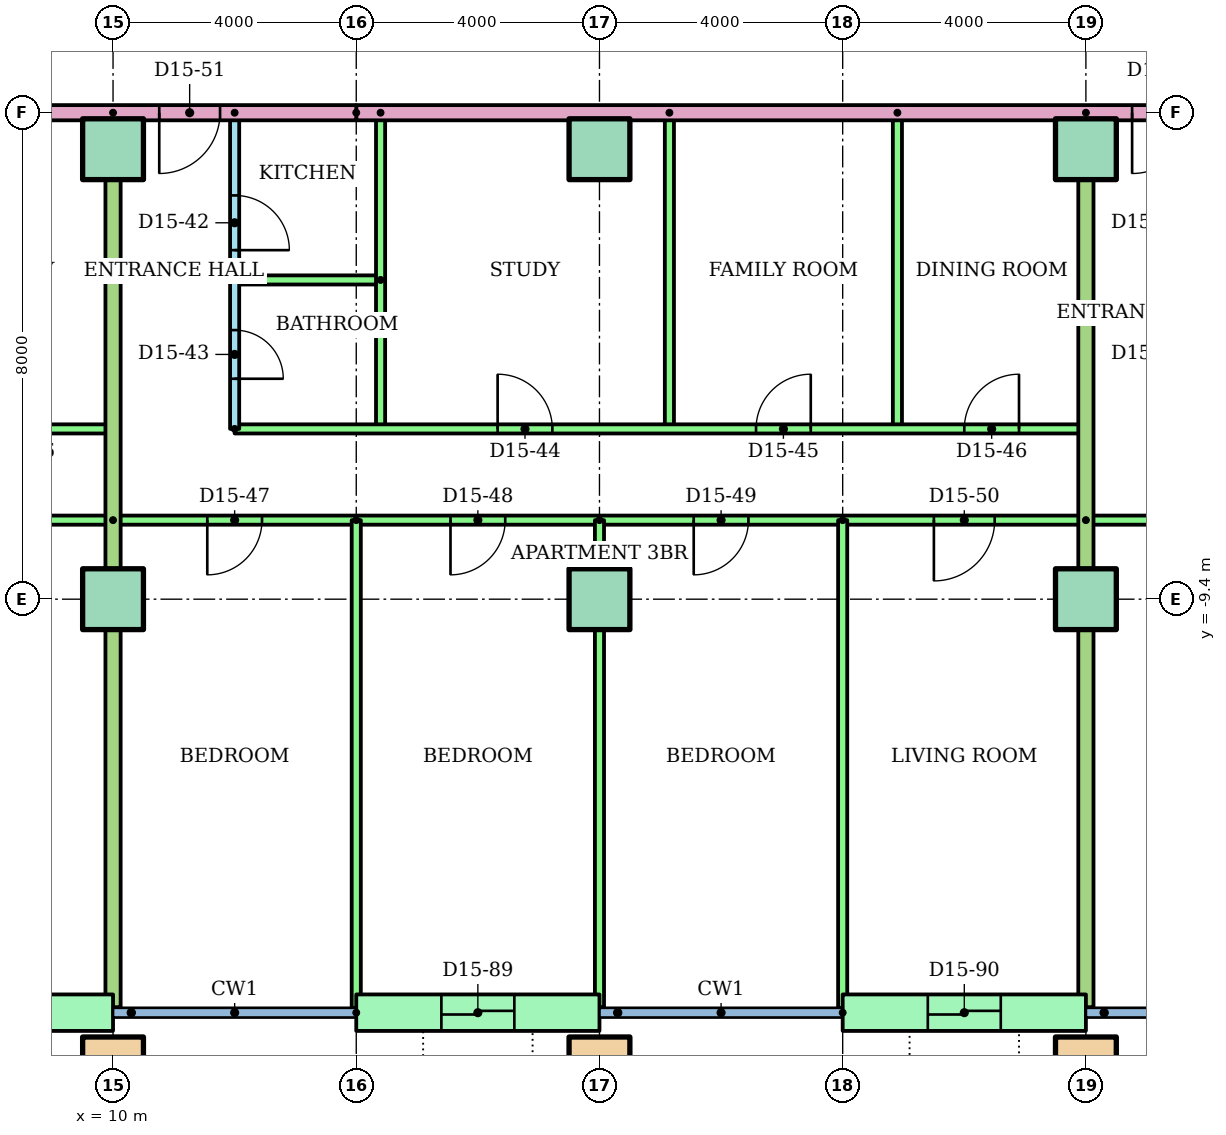
"""IFC4 building model, lengths in metres.
Left out: names, types, materials, properties, quantities, classifications, styles, units other than length and angle.
Written with IfcOpenShell. Run it as: python <this file> out.ifc"""

import sys

from ifc_helpers import new_model, si_unit, direction, frame, frame_2d, origin, origin_2d, place, context, subcontext, project, spatial, rectangle, hollow_rectangle, extrude, element, fill, save


model = new_model("IFC4")
c1 = context("Model", 3, precision=1e-05, world=origin(), true_north=direction((0.0, 1.0)))
c2 = subcontext(c1, "Body", "Model", "MODEL_VIEW")
j1 = project(units=[si_unit("LENGTHUNIT", "METRE"), si_unit("PLANEANGLEUNIT", "RADIAN")], contexts=[c1])
p1 = place(None, origin())
s1 = spatial("IfcSite", under=j1, at=p1, CompositionType="ELEMENT")
p2 = place(p1, origin())
s2 = spatial("IfcBuilding", under=s1, at=p2, CompositionType="ELEMENT")
p3 = place(p2, frame((0.0, 0.0, 57.6)))
s3 = spatial("IfcBuildingStorey", under=s2, at=p3, CompositionType="ELEMENT", Elevation=57.6)
for number, where in (
    (1, (10.0, -17.1, 0.0)),
    (2, (18.0, -17.1, 0.0)),
    (3, (26.0, -17.1, 0.0)),
):
    element("IfcColumn", number, at=place(p3, frame(where)), inside=s3, PredefinedType="COLUMN", context=c2, shape_type="SweptSolid", body=[
        extrude(hollow_rectangle(XDim=1.0, YDim=1.0, WallThickness=0.05, at=origin_2d()), origin(), (0.0, 0.0, 1.0), 3.2),
    ])
for number, where in (
    (4, (10.0, -9.4, 0.0)),
    (5, (18.0, -9.4, 0.0)),
    (6, (26.0, -9.4, 0.0)),
    (7, (10.0, -2.0, 0.0)),
    (8, (18.0, -2.0, 0.0)),
    (9, (26.0, -2.0, 0.0)),
):
    element("IfcColumn", number, at=place(p3, frame(where)), inside=s3, PredefinedType="COLUMN", context=c2, shape_type="SweptSolid", body=[
        extrude(rectangle(XDim=1.0, YDim=1.0, at=origin_2d()), origin(), (0.0, 0.0, 1.0), 3.2),
    ])
p4 = place(p3, frame((6.0, -16.2, 0.0)))
e10 = element("IfcWall", 10, at=p4, inside=s3, PredefinedType="STANDARD", context=c2, shape_type="SweptSolid", body=[
    extrude(rectangle(XDim=4.0, YDim=0.6, at=frame_2d((2.0, 0.0))), origin(), (0.0, 0.0, 1.0), 2.92),
])
p5 = place(p4, frame((1.4, 0.0, 0.0)))
e11 = element("IfcOpeningElement", 11, at=p5, cuts=e10, PredefinedType="OPENING", context=c2, shape_type="SweptSolid", body=[
    extrude(rectangle(XDim=1.2, YDim=2.1, at=frame_2d((0.6, 1.05))), frame((0.0, 0.31, 0.0), z_axis=(0.0, -1.0, 0.0), x_axis=(1.0, 0.0, 0.0)), (0.0, 0.0, 1.0), 0.62),
])
p6 = place(p3, frame((14.0, -16.2, 0.0)))
e12 = element("IfcWall", 12, at=p6, inside=s3, PredefinedType="STANDARD", context=c2, shape_type="SweptSolid", body=[
    extrude(rectangle(XDim=4.0, YDim=0.6, at=frame_2d((2.0, 0.0))), origin(), (0.0, 0.0, 1.0), 2.92),
])
p7 = place(p6, frame((1.4, 0.0, 0.0)))
e13 = element("IfcOpeningElement", 13, at=p7, cuts=e12, PredefinedType="OPENING", context=c2, shape_type="SweptSolid", body=[
    extrude(rectangle(XDim=1.2, YDim=2.1, at=frame_2d((0.6, 1.05))), frame((0.0, 0.31, 0.0), z_axis=(0.0, -1.0, 0.0), x_axis=(1.0, 0.0, 0.0)), (0.0, 0.0, 1.0), 0.62),
])
p8 = place(p3, frame((22.0, -16.2, 0.0)))
e14 = element("IfcWall", 14, at=p8, inside=s3, PredefinedType="STANDARD", context=c2, shape_type="SweptSolid", body=[
    extrude(rectangle(XDim=4.0, YDim=0.6, at=frame_2d((2.0, 0.0))), origin(), (0.0, 0.0, 1.0), 2.92),
])
p9 = place(p8, frame((1.4, 0.0, 0.0)))
e15 = element("IfcOpeningElement", 15, at=p9, cuts=e14, PredefinedType="OPENING", context=c2, shape_type="SweptSolid", body=[
    extrude(rectangle(XDim=1.2, YDim=2.1, at=frame_2d((0.6, 1.05))), frame((0.0, 0.31, 0.0), z_axis=(0.0, -1.0, 0.0), x_axis=(1.0, 0.0, 0.0)), (0.0, 0.0, 1.0), 0.62),
])
p10 = place(p3, frame((-4.0, -6.6, 0.0)))
e16 = element("IfcWall", 16, at=p10, inside=s3, PredefinedType="PARTITIONING", context=c2, shape_type="SweptSolid", body=[
    extrude(rectangle(XDim=14.0, YDim=0.15, at=frame_2d((7.0, 0.0))), origin(), (0.0, 0.0, 1.0), 2.4),
])
p11 = place(p10, frame((4.325, 0.0, 0.0)))
e17 = element("IfcOpeningElement", 17, at=p11, cuts=e16, PredefinedType="OPENING", context=c2, shape_type="SweptSolid", body=[
    extrude(rectangle(XDim=0.9, YDim=2.1, at=frame_2d((0.45, 1.05))), frame((0.0, 0.085, 0.0), z_axis=(0.0, -1.0, 0.0), x_axis=(1.0, 0.0, 0.0)), (0.0, 0.0, 1.0), 0.17),
])
p12 = place(p10, frame((8.575, 0.0, 0.0)))
e18 = element("IfcOpeningElement", 18, at=p12, cuts=e16, PredefinedType="OPENING", context=c2, shape_type="SweptSolid", body=[
    extrude(rectangle(XDim=0.9, YDim=2.1, at=frame_2d((0.45, 1.05))), frame((0.0, 0.085, 0.0), z_axis=(0.0, -1.0, 0.0), x_axis=(1.0, 0.0, 0.0)), (0.0, 0.0, 1.0), 0.17),
])
p13 = place(p10, frame((12.0, 0.0, 0.0)))
e19 = element("IfcOpeningElement", 19, at=p13, cuts=e16, PredefinedType="OPENING", context=c2, shape_type="SweptSolid", body=[
    extrude(rectangle(XDim=0.9, YDim=2.1, at=frame_2d((0.45, 1.05))), frame((0.0, 0.085, 0.0), z_axis=(0.0, -1.0, 0.0), x_axis=(1.0, 0.0, 0.0)), (0.0, 0.0, 1.0), 0.17),
])
p14 = place(p3, frame((10.0, -8.1, 0.0), z_axis=(0.0, 0.0, 1.0), x_axis=(-1.0, 0.0, 0.0)))
e20 = element("IfcWall", 20, at=p14, inside=s3, PredefinedType="PARTITIONING", context=c2, shape_type="SweptSolid", body=[
    extrude(rectangle(XDim=16.0, YDim=0.15, at=frame_2d((8.0, 0.0))), origin(), (0.0, 0.0, 1.0), 2.4),
])
p15 = place(p14, frame((13.55, 0.0, 0.0)))
e21 = element("IfcOpeningElement", 21, at=p15, cuts=e20, PredefinedType="OPENING", context=c2, shape_type="SweptSolid", body=[
    extrude(rectangle(XDim=0.9, YDim=2.1, at=frame_2d((0.45, 1.05))), frame((0.0, 0.085, 0.0), z_axis=(0.0, -1.0, 0.0), x_axis=(1.0, 0.0, 0.0)), (0.0, 0.0, 1.0), 0.17),
])
p16 = place(p14, frame((9.5, 0.0, 0.0)))
e22 = element("IfcOpeningElement", 22, at=p16, cuts=e20, PredefinedType="OPENING", context=c2, shape_type="SweptSolid", body=[
    extrude(rectangle(XDim=1.0, YDim=2.1, at=frame_2d((0.5, 1.05))), frame((0.0, 0.085, 0.0), z_axis=(0.0, -1.0, 0.0), x_axis=(1.0, 0.0, 0.0)), (0.0, 0.0, 1.0), 0.17),
])
p17 = place(p14, frame((5.55, 0.0, 0.0)))
e23 = element("IfcOpeningElement", 23, at=p17, cuts=e20, PredefinedType="OPENING", context=c2, shape_type="SweptSolid", body=[
    extrude(rectangle(XDim=0.9, YDim=2.1, at=frame_2d((0.45, 1.05))), frame((0.0, 0.085, 0.0), z_axis=(0.0, -1.0, 0.0), x_axis=(1.0, 0.0, 0.0)), (0.0, 0.0, 1.0), 0.17),
])
p18 = place(p14, frame((1.55, 0.0, 0.0)))
e24 = element("IfcOpeningElement", 24, at=p18, cuts=e20, PredefinedType="OPENING", context=c2, shape_type="SweptSolid", body=[
    extrude(rectangle(XDim=0.9, YDim=2.1, at=frame_2d((0.45, 1.05))), frame((0.0, 0.085, 0.0), z_axis=(0.0, -1.0, 0.0), x_axis=(1.0, 0.0, 0.0)), (0.0, 0.0, 1.0), 0.17),
])
p19 = place(p3, frame((12.0, -1.4, 0.0), z_axis=(0.0, 0.0, 1.0), x_axis=(0.0, -1.0, 0.0)))
e25 = element("IfcWall", 25, at=p19, inside=s3, PredefinedType="PARTITIONING", context=c2, shape_type="SweptSolid", body=[
    extrude(rectangle(XDim=5.2, YDim=0.15, at=frame_2d((2.6, 0.0))), origin(), (0.0, 0.0, 1.0), 2.4),
])
p20 = place(p19, frame((1.36, 0.0, 0.0)))
e26 = element("IfcOpeningElement", 26, at=p20, cuts=e25, PredefinedType="OPENING", context=c2, shape_type="SweptSolid", body=[
    extrude(rectangle(XDim=0.9, YDim=2.1, at=frame_2d((0.45, 1.05))), frame((0.0, 0.085, 0.0), z_axis=(0.0, -1.0, 0.0), x_axis=(1.0, 0.0, 0.0)), (0.0, 0.0, 1.0), 0.17),
])
p21 = place(p19, frame((3.575, 0.0, 0.0)))
e27 = element("IfcOpeningElement", 27, at=p21, cuts=e25, PredefinedType="OPENING", context=c2, shape_type="SweptSolid", body=[
    extrude(rectangle(XDim=0.8, YDim=2.1, at=frame_2d((0.4, 1.05))), frame((0.0, 0.085, 0.0), z_axis=(0.0, -1.0, 0.0), x_axis=(1.0, 0.0, 0.0)), (0.0, 0.0, 1.0), 0.17),
])
p22 = place(p3, frame((14.4, -4.15, 0.0), z_axis=(0.0, 0.0, 1.0), x_axis=(-1.0, 0.0, 0.0)))
e28 = element("IfcWall", 28, at=p22, inside=s3, PredefinedType="PARTITIONING", context=c2, shape_type="SweptSolid", body=[
    extrude(rectangle(XDim=2.4, YDim=0.15, at=frame_2d((1.2, 0.0))), origin(), (0.0, 0.0, 1.0), 2.4),
])
for number, where, z_axis, x_axis in (
    (29, (14.4, -1.4, 0.0), (0.0, 0.0, 1.0), (0.0, -1.0, 0.0)),
    (30, (19.15, -1.4, 0.0), (0.0, 0.0, 1.0), (0.0, -1.0, 0.0)),
    (31, (22.9, -1.4, 0.0), (0.0, 0.0, 1.0), (0.0, -1.0, 0.0)),
):
    element("IfcWall", number, at=place(p3, frame(where, z_axis=z_axis, x_axis=x_axis)), inside=s3, PredefinedType="PARTITIONING", context=c2, shape_type="SweptSolid", body=[
        extrude(rectangle(XDim=5.2, YDim=0.15, at=frame_2d((2.6, 0.0))), origin(), (0.0, 0.0, 1.0), 2.4),
    ])
p23 = place(p3, frame((12.0, -6.6, 0.0)))
e32 = element("IfcWall", 32, at=p23, inside=s3, PredefinedType="PARTITIONING", context=c2, shape_type="SweptSolid", body=[
    extrude(rectangle(XDim=14.0, YDim=0.15, at=frame_2d((7.0, 0.0))), origin(), (0.0, 0.0, 1.0), 2.4),
])
p24 = place(p23, frame((4.325, 0.0, 0.0)))
e33 = element("IfcOpeningElement", 33, at=p24, cuts=e32, PredefinedType="OPENING", context=c2, shape_type="SweptSolid", body=[
    extrude(rectangle(XDim=0.9, YDim=2.1, at=frame_2d((0.45, 1.05))), frame((0.0, 0.085, 0.0), z_axis=(0.0, -1.0, 0.0), x_axis=(1.0, 0.0, 0.0)), (0.0, 0.0, 1.0), 0.17),
])
p25 = place(p23, frame((8.575, 0.0, 0.0)))
e34 = element("IfcOpeningElement", 34, at=p25, cuts=e32, PredefinedType="OPENING", context=c2, shape_type="SweptSolid", body=[
    extrude(rectangle(XDim=0.9, YDim=2.1, at=frame_2d((0.45, 1.05))), frame((0.0, 0.085, 0.0), z_axis=(0.0, -1.0, 0.0), x_axis=(1.0, 0.0, 0.0)), (0.0, 0.0, 1.0), 0.17),
])
p26 = place(p23, frame((12.0, 0.0, 0.0)))
e35 = element("IfcOpeningElement", 35, at=p26, cuts=e32, PredefinedType="OPENING", context=c2, shape_type="SweptSolid", body=[
    extrude(rectangle(XDim=0.9, YDim=2.1, at=frame_2d((0.45, 1.05))), frame((0.0, 0.085, 0.0), z_axis=(0.0, -1.0, 0.0), x_axis=(1.0, 0.0, 0.0)), (0.0, 0.0, 1.0), 0.17),
])
p27 = place(p3, frame((26.0, -8.1, 0.0), z_axis=(0.0, 0.0, 1.0), x_axis=(-1.0, 0.0, 0.0)))
e36 = element("IfcWall", 36, at=p27, inside=s3, PredefinedType="PARTITIONING", context=c2, shape_type="SweptSolid", body=[
    extrude(rectangle(XDim=16.0, YDim=0.15, at=frame_2d((8.0, 0.0))), origin(), (0.0, 0.0, 1.0), 2.4),
])
p28 = place(p27, frame((13.55, 0.0, 0.0)))
e37 = element("IfcOpeningElement", 37, at=p28, cuts=e36, PredefinedType="OPENING", context=c2, shape_type="SweptSolid", body=[
    extrude(rectangle(XDim=0.9, YDim=2.1, at=frame_2d((0.45, 1.05))), frame((0.0, 0.085, 0.0), z_axis=(0.0, -1.0, 0.0), x_axis=(1.0, 0.0, 0.0)), (0.0, 0.0, 1.0), 0.17),
])
p29 = place(p27, frame((9.55, 0.0, 0.0)))
e38 = element("IfcOpeningElement", 38, at=p29, cuts=e36, PredefinedType="OPENING", context=c2, shape_type="SweptSolid", body=[
    extrude(rectangle(XDim=0.9, YDim=2.1, at=frame_2d((0.45, 1.05))), frame((0.0, 0.085, 0.0), z_axis=(0.0, -1.0, 0.0), x_axis=(1.0, 0.0, 0.0)), (0.0, 0.0, 1.0), 0.17),
])
p30 = place(p27, frame((5.55, 0.0, 0.0)))
e39 = element("IfcOpeningElement", 39, at=p30, cuts=e36, PredefinedType="OPENING", context=c2, shape_type="SweptSolid", body=[
    extrude(rectangle(XDim=0.9, YDim=2.1, at=frame_2d((0.45, 1.05))), frame((0.0, 0.085, 0.0), z_axis=(0.0, -1.0, 0.0), x_axis=(1.0, 0.0, 0.0)), (0.0, 0.0, 1.0), 0.17),
])
p31 = place(p27, frame((1.5, 0.0, 0.0)))
e40 = element("IfcOpeningElement", 40, at=p31, cuts=e36, PredefinedType="OPENING", context=c2, shape_type="SweptSolid", body=[
    extrude(rectangle(XDim=1.0, YDim=2.1, at=frame_2d((0.5, 1.05))), frame((0.0, 0.085, 0.0), z_axis=(0.0, -1.0, 0.0), x_axis=(1.0, 0.0, 0.0)), (0.0, 0.0, 1.0), 0.17),
])
p32 = place(p3, frame((14.0, -8.1, 0.0), z_axis=(0.0, 0.0, 1.0), x_axis=(0.0, -1.0, 0.0)))
e41 = element("IfcWall", 41, at=p32, inside=s3, PredefinedType="PARTITIONING", context=c2, shape_type="SweptSolid", body=[
    extrude(rectangle(XDim=8.021, YDim=0.15, at=frame_2d((4.01, 0.0))), origin(), (0.0, 0.0, 1.0), 2.4),
])
p33 = place(p3, frame((18.0, -8.1, 0.0), z_axis=(0.0, 0.0, 1.0), x_axis=(0.0, -1.0, 0.0)))
e42 = element("IfcWall", 42, at=p33, inside=s3, PredefinedType="PARTITIONING", context=c2, shape_type="SweptSolid", body=[
    extrude(rectangle(XDim=8.01, YDim=0.15, at=frame_2d((4.005, 0.0))), origin(), (0.0, 0.0, 1.0), 2.4),
])
p34 = place(p3, frame((22.0, -8.1, 0.0), z_axis=(0.0, 0.0, 1.0), x_axis=(0.0, -1.0, 0.0)))
e43 = element("IfcWall", 43, at=p34, inside=s3, PredefinedType="PARTITIONING", context=c2, shape_type="SweptSolid", body=[
    extrude(rectangle(XDim=8.021, YDim=0.15, at=frame_2d((4.01, 0.0))), origin(), (0.0, 0.0, 1.0), 2.4),
])
p35 = place(p3, frame((10.0, -1.4, 0.0), z_axis=(0.0, 0.0, 1.0), x_axis=(0.0, -1.0, 0.0)))
e44 = element("IfcWall", 44, at=p35, inside=s3, PredefinedType="PARTITIONING", context=c2, shape_type="SweptSolid", body=[
    extrude(rectangle(XDim=14.71, YDim=0.25, at=frame_2d((7.355, 0.0))), origin(), (0.0, 0.0, 1.0), 2.4),
])
p36 = place(p3, frame((36.52, -8.1, 0.0), z_axis=(0.0, 0.0, 1.0), x_axis=(-1.0, 0.0, 0.0)))
e45 = element("IfcWall", 45, at=p36, inside=s3, PredefinedType="PARTITIONING", context=c2, shape_type="SweptSolid", body=[
    extrude(rectangle(XDim=10.52, YDim=0.15, at=frame_2d((5.26, 0.0))), origin(), (0.0, 0.0, 1.0), 2.4),
])
p37 = place(p36, frame((7.12, 0.0, 0.0)))
e46 = element("IfcOpeningElement", 46, at=p37, cuts=e45, PredefinedType="OPENING", context=c2, shape_type="SweptSolid", body=[
    extrude(rectangle(XDim=1.0, YDim=2.1, at=frame_2d((0.5, 1.05))), frame((0.0, 0.085, 0.0), z_axis=(0.0, -1.0, 0.0), x_axis=(1.0, 0.0, 0.0)), (0.0, 0.0, 1.0), 0.17),
])
p38 = place(p36, frame((0.76, 0.0, 0.0)))
e47 = element("IfcOpeningElement", 47, at=p38, cuts=e45, PredefinedType="OPENING", context=c2, shape_type="SweptSolid", body=[
    extrude(rectangle(XDim=1.0, YDim=2.1, at=frame_2d((0.5, 1.05))), frame((0.0, 0.085, 0.0), z_axis=(0.0, -1.0, 0.0), x_axis=(1.0, 0.0, 0.0)), (0.0, 0.0, 1.0), 0.17),
])
p39 = place(p3, frame((26.0, -1.4, 0.0), z_axis=(0.0, 0.0, 1.0), x_axis=(0.0, -1.0, 0.0)))
e48 = element("IfcWall", 48, at=p39, inside=s3, PredefinedType="PARTITIONING", context=c2, shape_type="SweptSolid", body=[
    extrude(rectangle(XDim=14.71, YDim=0.25, at=frame_2d((7.355, 0.0))), origin(), (0.0, 0.0, 1.0), 2.4),
])
p40 = place(p3, frame((29.0, -1.4, 0.0), z_axis=(0.0, 0.0, 1.0), x_axis=(-1.0, 0.0, 0.0)))
e49 = element("IfcWall", 49, at=p40, inside=s3, PredefinedType="PARTITIONING", context=c2, shape_type="SweptSolid", body=[
    extrude(rectangle(XDim=15.0, YDim=0.25, at=frame_2d((7.5, 0.0))), origin(), (0.0, 0.0, 1.0), 2.4),
])
p41 = place(p40, frame((1.24, 0.0, 0.0)))
e50 = element("IfcOpeningElement", 50, at=p41, cuts=e49, PredefinedType="OPENING", context=c2, shape_type="SweptSolid", body=[
    extrude(rectangle(XDim=1.0, YDim=2.1, at=frame_2d((0.5, 1.05))), frame((0.0, 0.135, 0.0), z_axis=(0.0, -1.0, 0.0), x_axis=(1.0, 0.0, 0.0)), (0.0, 0.0, 1.0), 0.27),
])
p42 = place(p3, frame((14.0, -1.4, 0.0), z_axis=(0.0, 0.0, 1.0), x_axis=(-1.0, 0.0, 0.0)))
e51 = element("IfcWall", 51, at=p42, inside=s3, PredefinedType="PARTITIONING", context=c2, shape_type="SweptSolid", body=[
    extrude(rectangle(XDim=28.0, YDim=0.25, at=frame_2d((14.0, 0.0))), origin(), (0.0, 0.0, 1.0), 2.4),
])
p43 = place(p42, frame((20.76, 0.0, 0.0)))
e52 = element("IfcOpeningElement", 52, at=p43, cuts=e51, PredefinedType="OPENING", context=c2, shape_type="SweptSolid", body=[
    extrude(rectangle(XDim=1.0, YDim=2.1, at=frame_2d((0.5, 1.05))), frame((0.0, 0.135, 0.0), z_axis=(0.0, -1.0, 0.0), x_axis=(1.0, 0.0, 0.0)), (0.0, 0.0, 1.0), 0.27),
])
p44 = place(p42, frame((18.24, 0.0, 0.0)))
e53 = element("IfcOpeningElement", 53, at=p44, cuts=e51, PredefinedType="OPENING", context=c2, shape_type="SweptSolid", body=[
    extrude(rectangle(XDim=1.0, YDim=2.1, at=frame_2d((0.5, 1.05))), frame((0.0, 0.135, 0.0), z_axis=(0.0, -1.0, 0.0), x_axis=(1.0, 0.0, 0.0)), (0.0, 0.0, 1.0), 0.27),
])
p45 = place(p42, frame((2.24, 0.0, 0.0)))
e54 = element("IfcOpeningElement", 54, at=p45, cuts=e51, PredefinedType="OPENING", context=c2, shape_type="SweptSolid", body=[
    extrude(rectangle(XDim=1.0, YDim=2.1, at=frame_2d((0.5, 1.05))), frame((0.0, 0.135, 0.0), z_axis=(0.0, -1.0, 0.0), x_axis=(1.0, 0.0, 0.0)), (0.0, 0.0, 1.0), 0.27),
])
p46 = place(p20, origin())
e55 = element("IfcDoor", 55, at=p46, inside=s3, OperationType="SINGLE_SWING_RIGHT", PredefinedType="DOOR", context=c2, shape_type="SweptSolid", body=[
    extrude(rectangle(XDim=0.9, YDim=2.1, at=frame_2d((0.45, 1.05))), frame((0.0, 0.025, 0.0), z_axis=(0.0, -1.0, 0.0), x_axis=(1.0, 0.0, 0.0)), (0.0, 0.0, 1.0), 0.05),
])
fill(e26, e55)
p47 = place(p21, origin())
e56 = element("IfcDoor", 56, at=p47, inside=s3, OperationType="SINGLE_SWING_RIGHT", PredefinedType="DOOR", context=c2, shape_type="SweptSolid", body=[
    extrude(rectangle(XDim=0.8, YDim=2.1, at=frame_2d((0.4, 1.05))), frame((0.0, 0.025, 0.0), z_axis=(0.0, -1.0, 0.0), x_axis=(1.0, 0.0, 0.0)), (0.0, 0.0, 1.0), 0.05),
])
fill(e27, e56)
p48 = place(p24, origin())
e57 = element("IfcDoor", 57, at=p48, inside=s3, OperationType="SINGLE_SWING_LEFT", PredefinedType="DOOR", context=c2, shape_type="SweptSolid", body=[
    extrude(rectangle(XDim=0.9, YDim=2.1, at=frame_2d((0.45, 1.05))), frame((0.0, 0.025, 0.0), z_axis=(0.0, -1.0, 0.0), x_axis=(1.0, 0.0, 0.0)), (0.0, 0.0, 1.0), 0.05),
])
fill(e33, e57)
p49 = place(p25, origin())
e58 = element("IfcDoor", 58, at=p49, inside=s3, OperationType="SINGLE_SWING_RIGHT", PredefinedType="DOOR", context=c2, shape_type="SweptSolid", body=[
    extrude(rectangle(XDim=0.9, YDim=2.1, at=frame_2d((0.45, 1.05))), frame((0.0, 0.025, 0.0), z_axis=(0.0, -1.0, 0.0), x_axis=(1.0, 0.0, 0.0)), (0.0, 0.0, 1.0), 0.05),
])
fill(e34, e58)
p50 = place(p26, origin())
e59 = element("IfcDoor", 59, at=p50, inside=s3, OperationType="SINGLE_SWING_RIGHT", PredefinedType="DOOR", context=c2, shape_type="SweptSolid", body=[
    extrude(rectangle(XDim=0.9, YDim=2.1, at=frame_2d((0.45, 1.05))), frame((0.0, 0.025, 0.0), z_axis=(0.0, -1.0, 0.0), x_axis=(1.0, 0.0, 0.0)), (0.0, 0.0, 1.0), 0.05),
])
fill(e35, e59)
p51 = place(p28, origin())
e60 = element("IfcDoor", 60, at=p51, inside=s3, OperationType="SINGLE_SWING_RIGHT", PredefinedType="DOOR", context=c2, shape_type="SweptSolid", body=[
    extrude(rectangle(XDim=0.9, YDim=2.1, at=frame_2d((0.45, 1.05))), frame((0.0, 0.025, 0.0), z_axis=(0.0, -1.0, 0.0), x_axis=(1.0, 0.0, 0.0)), (0.0, 0.0, 1.0), 0.05),
])
fill(e37, e60)
p52 = place(p29, origin())
e61 = element("IfcDoor", 61, at=p52, inside=s3, OperationType="SINGLE_SWING_RIGHT", PredefinedType="DOOR", context=c2, shape_type="SweptSolid", body=[
    extrude(rectangle(XDim=0.9, YDim=2.1, at=frame_2d((0.45, 1.05))), frame((0.0, 0.025, 0.0), z_axis=(0.0, -1.0, 0.0), x_axis=(1.0, 0.0, 0.0)), (0.0, 0.0, 1.0), 0.05),
])
fill(e38, e61)
p53 = place(p30, origin())
e62 = element("IfcDoor", 62, at=p53, inside=s3, OperationType="SINGLE_SWING_RIGHT", PredefinedType="DOOR", context=c2, shape_type="SweptSolid", body=[
    extrude(rectangle(XDim=0.9, YDim=2.1, at=frame_2d((0.45, 1.05))), frame((0.0, 0.025, 0.0), z_axis=(0.0, -1.0, 0.0), x_axis=(1.0, 0.0, 0.0)), (0.0, 0.0, 1.0), 0.05),
])
fill(e39, e62)
p54 = place(p31, origin())
e63 = element("IfcDoor", 63, at=p54, inside=s3, OperationType="SINGLE_SWING_RIGHT", PredefinedType="DOOR", context=c2, shape_type="SweptSolid", body=[
    extrude(rectangle(XDim=1.0, YDim=2.1, at=frame_2d((0.5, 1.05))), frame((0.0, 0.025, 0.0), z_axis=(0.0, -1.0, 0.0), x_axis=(1.0, 0.0, 0.0)), (0.0, 0.0, 1.0), 0.05),
])
fill(e40, e63)
p55 = place(p45, origin())
e64 = element("IfcDoor", 64, at=p55, inside=s3, OperationType="SINGLE_SWING_RIGHT", PredefinedType="DOOR", context=c2, shape_type="SweptSolid", body=[
    extrude(rectangle(XDim=1.0, YDim=2.1, at=frame_2d((0.5, 1.05))), frame((0.0, 0.025, 0.0), z_axis=(0.0, -1.0, 0.0), x_axis=(1.0, 0.0, 0.0)), (0.0, 0.0, 1.0), 0.05),
])
fill(e54, e64)
p56 = place(p41, origin())
e65 = element("IfcDoor", 65, at=p56, inside=s3, OperationType="SINGLE_SWING_RIGHT", PredefinedType="DOOR", context=c2, shape_type="SweptSolid", body=[
    extrude(rectangle(XDim=1.0, YDim=2.1, at=frame_2d((0.5, 1.05))), frame((0.0, 0.025, 0.0), z_axis=(0.0, -1.0, 0.0), x_axis=(1.0, 0.0, 0.0)), (0.0, 0.0, 1.0), 0.05),
])
fill(e50, e65)
p57 = place(p7, origin())
e66 = element("IfcDoor", 66, at=p57, inside=s3, OperationType="SLIDING_TO_LEFT", PredefinedType="DOOR", context=c2, shape_type="SweptSolid", body=[
    extrude(rectangle(XDim=1.2, YDim=2.1, at=frame_2d((0.6, 1.05))), frame((0.0, 0.025, 0.0), z_axis=(0.0, -1.0, 0.0), x_axis=(1.0, 0.0, 0.0)), (0.0, 0.0, 1.0), 0.05),
])
fill(e13, e66)
p58 = place(p9, origin())
e67 = element("IfcDoor", 67, at=p58, inside=s3, OperationType="SLIDING_TO_LEFT", PredefinedType="DOOR", context=c2, shape_type="SweptSolid", body=[
    extrude(rectangle(XDim=1.2, YDim=2.1, at=frame_2d((0.6, 1.05))), frame((0.0, 0.025, 0.0), z_axis=(0.0, -1.0, 0.0), x_axis=(1.0, 0.0, 0.0)), (0.0, 0.0, 1.0), 0.05),
])
fill(e15, e67)
save(model, sys.argv[1])
